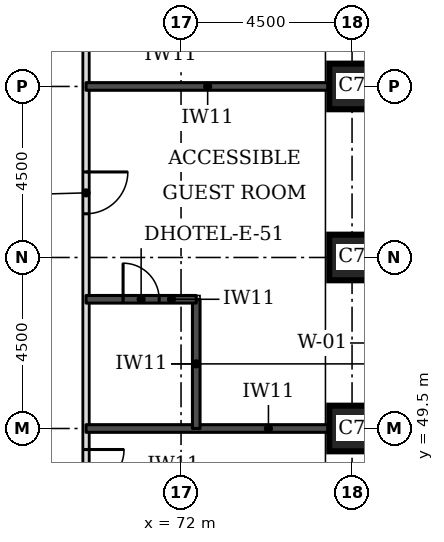
"""IFC4 building model, lengths in metres.
Left out: names, types, materials, properties, quantities, classifications, styles, units other than length and angle.
Written with IfcOpenShell. Run it as: python <this file> out.ifc"""

import sys

from ifc_helpers import new_model, si_unit, direction, frame, frame_2d, origin, origin_2d, place, context, subcontext, project, spatial, rectangle, extrude, element, fill, save


model = new_model("IFC4")
c1 = context("Model", 3, precision=1e-05, world=origin(), true_north=direction((0.0, 1.0)))
c2 = subcontext(c1, "Body", "Model", "MODEL_VIEW")
j1 = project(units=[si_unit("LENGTHUNIT", "METRE"), si_unit("PLANEANGLEUNIT", "RADIAN")], contexts=[c1])
p1 = place(None, origin())
s1 = spatial("IfcSite", under=j1, at=p1, CompositionType="ELEMENT")
p2 = place(p1, origin())
s2 = spatial("IfcBuilding", under=s1, at=p2, CompositionType="ELEMENT")
p3 = place(p2, frame((0.0, 0.0, 62.7)))
s3 = spatial("IfcBuildingStorey", under=s2, at=p3, CompositionType="ELEMENT", Elevation=62.7)
for number, where, z_axis, x_axis in (
    (1, (76.5, 49.5, 0.0), (0.0, 0.0, 1.0), (1.0, 0.0, 0.0)),
    (2, (76.5, 54.0, 0.0), (0.0, 0.0, 1.0), (1.0, 0.0, 0.0)),
    (3, (76.5, 58.5, 0.0), (0.0, 0.0, 1.0), (1.0, 0.0, 0.0)),
):
    element("IfcColumn", number, at=place(p3, frame(where, z_axis=z_axis, x_axis=x_axis)), inside=s3, PredefinedType="COLUMN", context=c2, shape_type="SweptSolid", body=[
        extrude(rectangle(XDim=1.2, YDim=1.2, at=origin_2d()), origin(), (0.0, 0.0, 1.0), 3.3),
    ])
p4 = place(p3, frame((69.5, 47.5, 0.0), z_axis=(0.0, 0.0, 1.0), x_axis=(0.0, 1.0, 0.0)))
e4 = element("IfcWall", 4, at=p4, inside=s3, PredefinedType="PARTITIONING", context=c2, shape_type="SweptSolid", body=[
    extrude(rectangle(XDim=26.5, YDim=0.15, at=frame_2d((13.25, 0.0))), origin(), (0.0, 0.0, 1.0), 3.08),
])
p5 = place(p4, frame((25.053, 0.0, 0.0)))
e5 = element("IfcOpeningElement", 5, at=p5, cuts=e4, PredefinedType="OPENING", context=c2, shape_type="SweptSolid", body=[
    extrude(rectangle(XDim=1.0, YDim=2.1, at=frame_2d((0.5, 1.05))), frame((0.0, 0.085, 0.0), z_axis=(0.0, -1.0, 0.0), x_axis=(1.0, 0.0, 0.0)), (0.0, 0.0, 1.0), 0.17),
])
p6 = place(p4, frame((13.775, 0.0, 0.0)))
e6 = element("IfcOpeningElement", 6, at=p6, cuts=e4, PredefinedType="OPENING", context=c2, shape_type="SweptSolid", body=[
    extrude(rectangle(XDim=1.0, YDim=2.1, at=frame_2d((0.5, 1.05))), frame((0.0, 0.085, 0.0), z_axis=(0.0, -1.0, 0.0), x_axis=(1.0, 0.0, 0.0)), (0.0, 0.0, 1.0), 0.17),
])
p7 = place(p4, frame((7.65, 0.0, 0.0)))
e7 = element("IfcOpeningElement", 7, at=p7, cuts=e4, PredefinedType="OPENING", context=c2, shape_type="SweptSolid", body=[
    extrude(rectangle(XDim=1.1, YDim=2.1, at=frame_2d((0.55, 1.05))), frame((0.0, 0.085, 0.0), z_axis=(0.0, -1.0, 0.0), x_axis=(1.0, 0.0, 0.0)), (0.0, 0.0, 1.0), 0.17),
])
p8 = place(p4, frame((0.447, 0.0, 0.0)))
e8 = element("IfcOpeningElement", 8, at=p8, cuts=e4, PredefinedType="OPENING", context=c2, shape_type="SweptSolid", body=[
    extrude(rectangle(XDim=1.0, YDim=2.1, at=frame_2d((0.5, 1.05))), frame((0.0, 0.085, 0.0), z_axis=(0.0, -1.0, 0.0), x_axis=(1.0, 0.0, 0.0)), (0.0, 0.0, 1.0), 0.17),
])
p9 = place(p3, frame((69.5, 49.5, 0.0), z_axis=(0.0, 0.0, 1.0), x_axis=(1.0, 0.0, 0.0)))
e9 = element("IfcWall", 9, at=p9, inside=s3, PredefinedType="SOLIDWALL", context=c2, shape_type="SweptSolid", body=[
    extrude(rectangle(XDim=6.4, YDim=0.2, at=frame_2d((3.2, 0.0))), origin(), (0.0, 0.0, 1.0), 3.08),
])
p10 = place(p3, frame((72.4, 49.5, 0.0), z_axis=(0.0, 0.0, 1.0), x_axis=(0.0, 1.0, 0.0)))
e10 = element("IfcWall", 10, at=p10, inside=s3, PredefinedType="SOLIDWALL", context=c2, shape_type="SweptSolid", body=[
    extrude(rectangle(XDim=3.4, YDim=0.2, at=frame_2d((1.7, 0.0))), origin(), (0.0, 0.0, 1.0), 3.08),
])
p11 = place(p3, frame((69.5, 52.9, 0.0), z_axis=(0.0, 0.0, 1.0), x_axis=(1.0, 0.0, 0.0)))
e11 = element("IfcWall", 11, at=p11, inside=s3, PredefinedType="SOLIDWALL", context=c2, shape_type="SweptSolid", body=[
    extrude(rectangle(XDim=2.9, YDim=0.2, at=frame_2d((1.45, 0.0))), origin(), (0.0, 0.0, 1.0), 3.08),
])
p12 = place(p11, frame((0.975, 0.0, 0.0)))
e12 = element("IfcOpeningElement", 12, at=p12, cuts=e11, PredefinedType="OPENING", context=c2, shape_type="SweptSolid", body=[
    extrude(rectangle(XDim=0.95, YDim=2.1, at=frame_2d((0.475, 1.05))), frame((0.0, 0.11, 0.0), z_axis=(0.0, -1.0, 0.0), x_axis=(1.0, 0.0, 0.0)), (0.0, 0.0, 1.0), 0.22),
])
p13 = place(p3, frame((69.5, 58.5, 0.0), z_axis=(0.0, 0.0, 1.0), x_axis=(1.0, 0.0, 0.0)))
e13 = element("IfcWall", 13, at=p13, inside=s3, PredefinedType="SOLIDWALL", context=c2, shape_type="SweptSolid", body=[
    extrude(rectangle(XDim=6.4, YDim=0.2, at=frame_2d((3.2, 0.0))), origin(), (0.0, 0.0, 1.0), 3.08),
])
p14 = place(p7, frame((1.1, 0.0, 0.0), z_axis=(0.0, 0.0, 1.0), x_axis=(-1.0, 0.0, 0.0)))
e14 = element("IfcDoor", 14, at=p14, inside=s3, OperationType="SINGLE_SWING_LEFT", PredefinedType="DOOR", context=c2, shape_type="SweptSolid", body=[
    extrude(rectangle(XDim=1.1, YDim=2.1, at=frame_2d((0.55, 1.05))), frame((0.0, 0.025, 0.0), z_axis=(0.0, -1.0, 0.0), x_axis=(1.0, 0.0, 0.0)), (0.0, 0.0, 1.0), 0.05),
])
fill(e7, e14)
p15 = place(p12, origin())
e15 = element("IfcDoor", 15, at=p15, inside=s3, OperationType="SINGLE_SWING_LEFT", PredefinedType="DOOR", context=c2, shape_type="SweptSolid", body=[
    extrude(rectangle(XDim=0.95, YDim=2.1, at=frame_2d((0.475, 1.05))), frame((0.0, 0.025, 0.0), z_axis=(0.0, -1.0, 0.0), x_axis=(1.0, 0.0, 0.0)), (0.0, 0.0, 1.0), 0.05),
])
fill(e12, e15)
p16 = place(p8, frame((1.0, 0.0, 0.0), z_axis=(0.0, 0.0, 1.0), x_axis=(-1.0, 0.0, 0.0)))
e16 = element("IfcDoor", 16, at=p16, inside=s3, OperationType="SINGLE_SWING_LEFT", PredefinedType="DOOR", context=c2, shape_type="SweptSolid", body=[
    extrude(rectangle(XDim=1.0, YDim=2.1, at=frame_2d((0.5, 1.05))), frame((0.0, 0.025, 0.0), z_axis=(0.0, -1.0, 0.0), x_axis=(1.0, 0.0, 0.0)), (0.0, 0.0, 1.0), 0.05),
])
fill(e8, e16)
save(model, sys.argv[1])
